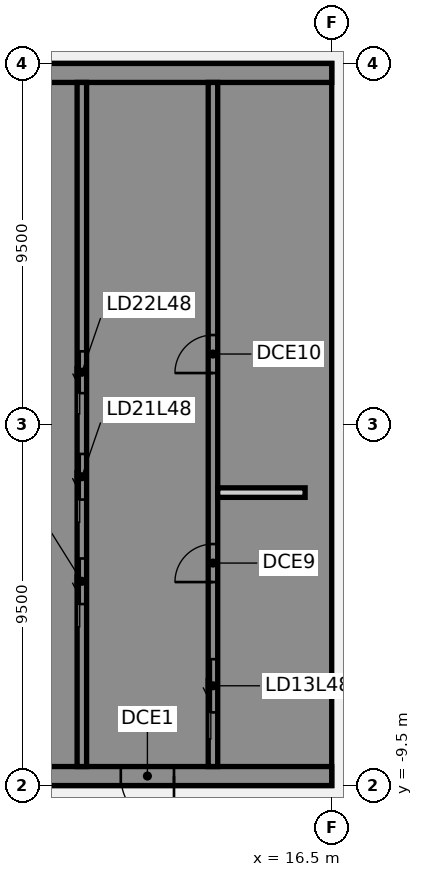
"""IFC4 building model, lengths in metres.
Left out: names, types, materials, properties, quantities, classifications, styles, units other than length and angle.
Written with IfcOpenShell. Run it as: python <this file> out.ifc"""

import sys

from ifc_helpers import new_model, si_unit, direction, frame, frame_2d, origin, place, context, subcontext, project, spatial, polyline, rectangle, outline, extrude, element, fill, save


model = new_model("IFC4")
c1 = context("Model", 3, precision=1e-05, world=origin(), true_north=direction((0.0, 1.0)))
c2 = subcontext(c1, "Body", "Model", "MODEL_VIEW")
j1 = project(units=[si_unit("LENGTHUNIT", "METRE"), si_unit("PLANEANGLEUNIT", "RADIAN")], contexts=[c1])
p1 = place(None, origin())
s1 = spatial("IfcSite", under=j1, at=p1, CompositionType="ELEMENT")
p2 = place(p1, origin())
s2 = spatial("IfcBuilding", under=s1, at=p2, CompositionType="ELEMENT")
p3 = place(p2, frame((0.0, 0.0, 193.3)))
s3 = spatial("IfcBuildingStorey", under=s2, at=p3, CompositionType="ELEMENT", Elevation=193.3)
p4 = place(p3, frame((16.5, -9.25, 0.0), z_axis=(0.0, 0.0, 1.0), x_axis=(-1.0, 0.0, 0.0)))
e1 = element("IfcWall", 1, at=p4, inside=s3, PredefinedType="SHEAR", context=c2, shape_type="SweptSolid", body=[
    extrude(rectangle(XDim=13.0, YDim=0.5, at=frame_2d((6.5, 0.0))), origin(), (0.0, 0.0, 1.0), 3.46),
])
p5 = place(p4, frame((4.15, 0.0, 0.0)))
e2 = element("IfcOpeningElement", 2, at=p5, cuts=e1, PredefinedType="OPENING", context=c2, shape_type="SweptSolid", body=[
    extrude(rectangle(XDim=1.4, YDim=2.1, at=frame_2d((0.7, 1.05))), frame((0.0, 0.26, 0.0), z_axis=(0.0, -1.0, 0.0), x_axis=(1.0, 0.0, 0.0)), (0.0, 0.0, 1.0), 0.52),
])
p6 = place(p4, frame((10.125, 0.0, 0.0)))
e3 = element("IfcOpeningElement", 3, at=p6, cuts=e1, PredefinedType="OPENING", context=c2, shape_type="SweptSolid", body=[
    extrude(rectangle(XDim=1.4, YDim=2.1, at=frame_2d((0.7, 1.05))), frame((0.0, 0.26, 0.0), z_axis=(0.0, -1.0, 0.0), x_axis=(1.0, 0.0, 0.0)), (0.0, 0.0, 1.0), 0.52),
])
p7 = place(p3, origin())
e4 = element("IfcWall", 4, at=p7, inside=s3, PredefinedType="SHEAR", context=c2, shape_type="SweptSolid", body=[
    extrude(outline(polyline([(13.5, -8.125), (13.5, -9.0), (16.0, -9.0), (16.5, -9.0), (16.5, 9.0), (16.0, 9.0), (13.5, 9.0), (13.5, 8.125), (16.0, 8.125), (16.0, 5.625), (13.5, 5.625), (13.5, 5.375), (16.0, 5.375), (16.0, -5.375), (13.5, -5.375), (13.5, -5.625), (16.0, -5.625), (16.0, -8.125), (13.5, -8.125)])), origin(), (0.0, 0.0, 1.0), 3.46),
])
p8 = place(p3, frame((16.5, 9.25, 0.0), z_axis=(0.0, 0.0, 1.0), x_axis=(-1.0, 0.0, 0.0)))
e5 = element("IfcWall", 5, at=p8, inside=s3, PredefinedType="SHEAR", context=c2, shape_type="SweptSolid", body=[
    extrude(rectangle(XDim=13.0, YDim=0.5, at=frame_2d((6.5, 0.0))), origin(), (0.0, 0.0, 1.0), 3.46),
])
p9 = place(p3, origin())
e6 = element("IfcWall", 6, at=p9, inside=s3, PredefinedType="SHEAR", context=c2, shape_type="SweptSolid", body=[
    extrude(outline(polyline([(9.8, -5.375), (7.5, -5.375), (7.5, -2.875), (9.8, -2.875), (9.8, -2.625), (7.5, -2.625), (7.5, -0.125), (9.8, -0.125), (9.8, 0.125), (7.5, 0.125), (7.5, 2.625), (9.8, 2.625), (9.8, 2.875), (7.5, 2.875), (7.5, 5.375), (9.8, 5.375), (9.8, 5.625), (7.5, 5.625), (7.5, 8.125), (9.8, 8.125), (9.8, 9.0), (7.5, 9.0), (7.25, 9.0), (7.25, -5.625), (7.5, -5.625), (9.8, -5.625), (9.8, -5.375)])), origin(), (0.0, 0.0, 1.0), 3.46),
])
p10 = place(p3, origin())
e7 = element("IfcWall", 7, at=p10, inside=s3, PredefinedType="SHEAR", context=c2, shape_type="SweptSolid", body=[
    extrude(outline(polyline([(7.5, -8.125), (7.5, -9.0), (9.8, -9.0), (9.8, -8.125), (9.8, -5.625), (9.55, -5.625), (9.55, -8.125), (7.5, -8.125)])), origin(), (0.0, 0.0, 1.0), 3.46),
])
p11 = place(p3, frame((13.375, -9.0, 0.0), z_axis=(0.0, 0.0, 1.0), x_axis=(0.0, 1.0, 0.0)))
e8 = element("IfcWall", 8, at=p11, inside=s3, PredefinedType="SHEAR", context=c2, shape_type="SweptSolid", body=[
    extrude(rectangle(XDim=18.0, YDim=0.25, at=frame_2d((9.0, 0.0))), origin(), (0.0, 0.0, 1.0), 3.46),
])
p12 = place(p11, frame((1.425, 0.0, 0.0)))
e9 = element("IfcOpeningElement", 9, at=p12, cuts=e8, PredefinedType="OPENING", context=c2, shape_type="SweptSolid", body=[
    extrude(rectangle(XDim=1.4, YDim=2.1, at=frame_2d((0.7, 1.05))), frame((0.0, 0.135, 0.0), z_axis=(0.0, -1.0, 0.0), x_axis=(1.0, 0.0, 0.0)), (0.0, 0.0, 1.0), 0.27),
])
p13 = place(p11, frame((4.854, 0.0, 0.0)))
e10 = element("IfcOpeningElement", 10, at=p13, cuts=e8, PredefinedType="OPENING", context=c2, shape_type="SweptSolid", body=[
    extrude(rectangle(XDim=1.0, YDim=2.1, at=frame_2d((0.5, 1.05))), frame((0.0, 0.135, 0.0), z_axis=(0.0, -1.0, 0.0), x_axis=(1.0, 0.0, 0.0)), (0.0, 0.0, 1.0), 0.27),
])
p14 = place(p11, frame((10.354, 0.0, 0.0)))
e11 = element("IfcOpeningElement", 11, at=p14, cuts=e8, PredefinedType="OPENING", context=c2, shape_type="SweptSolid", body=[
    extrude(rectangle(XDim=1.0, YDim=2.1, at=frame_2d((0.5, 1.05))), frame((0.0, 0.135, 0.0), z_axis=(0.0, -1.0, 0.0), x_axis=(1.0, 0.0, 0.0)), (0.0, 0.0, 1.0), 0.27),
])
p15 = place(p3, frame((9.925, -9.0, 0.0), z_axis=(0.0, 0.0, 1.0), x_axis=(0.0, 1.0, 0.0)))
e12 = element("IfcWall", 12, at=p15, inside=s3, PredefinedType="SHEAR", context=c2, shape_type="SweptSolid", body=[
    extrude(rectangle(XDim=18.0, YDim=0.25, at=frame_2d((9.0, 0.0))), origin(), (0.0, 0.0, 1.0), 3.46),
])
p16 = place(p15, frame((4.275, 0.0, 0.0)))
e13 = element("IfcOpeningElement", 13, at=p16, cuts=e12, PredefinedType="OPENING", context=c2, shape_type="SweptSolid", body=[
    extrude(rectangle(XDim=1.2, YDim=2.1, at=frame_2d((0.6, 1.05))), frame((0.0, 0.135, 0.0), z_axis=(0.0, -1.0, 0.0), x_axis=(1.0, 0.0, 0.0)), (0.0, 0.0, 1.0), 0.27),
])
p17 = place(p15, frame((7.025, 0.0, 0.0)))
e14 = element("IfcOpeningElement", 14, at=p17, cuts=e12, PredefinedType="OPENING", context=c2, shape_type="SweptSolid", body=[
    extrude(rectangle(XDim=1.2, YDim=2.1, at=frame_2d((0.6, 1.05))), frame((0.0, 0.135, 0.0), z_axis=(0.0, -1.0, 0.0), x_axis=(1.0, 0.0, 0.0)), (0.0, 0.0, 1.0), 0.27),
])
p18 = place(p15, frame((9.825, 0.0, 0.0)))
e15 = element("IfcOpeningElement", 15, at=p18, cuts=e12, PredefinedType="OPENING", context=c2, shape_type="SweptSolid", body=[
    extrude(rectangle(XDim=1.1, YDim=2.1, at=frame_2d((0.55, 1.05))), frame((0.0, 0.135, 0.0), z_axis=(0.0, -1.0, 0.0), x_axis=(1.0, 0.0, 0.0)), (0.0, 0.0, 1.0), 0.27),
])
p19 = place(p3, frame((15.8, -1.792, 0.0), z_axis=(0.0, 0.0, 1.0), x_axis=(-1.0, 0.0, 0.0)))
e16 = element("IfcWall", 16, at=p19, inside=s3, PredefinedType="PARTITIONING", context=c2, shape_type="SweptSolid", body=[
    extrude(rectangle(XDim=2.3, YDim=0.25, at=frame_2d((1.15, 0.0))), origin(), (0.0, 0.0, 1.0), 3.46),
])
p20 = place(p5, origin())
e17 = element("IfcDoor", 17, at=p20, inside=s3, OperationType="SINGLE_SWING_LEFT", PredefinedType="DOOR", context=c2, shape_type="SweptSolid", body=[
    extrude(rectangle(XDim=1.4, YDim=2.1, at=frame_2d((0.7, 1.05))), frame((0.0, 0.025, 0.0), z_axis=(0.0, -1.0, 0.0), x_axis=(1.0, 0.0, 0.0)), (0.0, 0.0, 1.0), 0.05),
])
fill(e2, e17)
p21 = place(p12, origin())
e18 = element("IfcDoor", 18, at=p21, inside=s3, OperationType="SLIDING_TO_LEFT", PredefinedType="DOOR", context=c2, shape_type="SweptSolid", body=[
    extrude(rectangle(XDim=1.4, YDim=2.1, at=frame_2d((0.7, 1.05))), frame((0.0, 0.025, 0.0), z_axis=(0.0, -1.0, 0.0), x_axis=(1.0, 0.0, 0.0)), (0.0, 0.0, 1.0), 0.05),
])
fill(e9, e18)
p22 = place(p16, origin())
e19 = element("IfcDoor", 19, at=p22, inside=s3, OperationType="SLIDING_TO_LEFT", PredefinedType="DOOR", context=c2, shape_type="SweptSolid", body=[
    extrude(rectangle(XDim=1.2, YDim=2.1, at=frame_2d((0.6, 1.05))), frame((0.0, 0.025, 0.0), z_axis=(0.0, -1.0, 0.0), x_axis=(1.0, 0.0, 0.0)), (0.0, 0.0, 1.0), 0.05),
])
fill(e13, e19)
p23 = place(p17, origin())
e20 = element("IfcDoor", 20, at=p23, inside=s3, OperationType="SLIDING_TO_LEFT", PredefinedType="DOOR", context=c2, shape_type="SweptSolid", body=[
    extrude(rectangle(XDim=1.2, YDim=2.1, at=frame_2d((0.6, 1.05))), frame((0.0, 0.025, 0.0), z_axis=(0.0, -1.0, 0.0), x_axis=(1.0, 0.0, 0.0)), (0.0, 0.0, 1.0), 0.05),
])
fill(e14, e20)
p24 = place(p18, origin())
e21 = element("IfcDoor", 21, at=p24, inside=s3, OperationType="SLIDING_TO_LEFT", PredefinedType="DOOR", context=c2, shape_type="SweptSolid", body=[
    extrude(rectangle(XDim=1.1, YDim=2.1, at=frame_2d((0.55, 1.05))), frame((0.0, 0.025, 0.0), z_axis=(0.0, -1.0, 0.0), x_axis=(1.0, 0.0, 0.0)), (0.0, 0.0, 1.0), 0.05),
])
fill(e15, e21)
p25 = place(p13, origin())
e22 = element("IfcDoor", 22, at=p25, inside=s3, OperationType="SINGLE_SWING_LEFT", PredefinedType="DOOR", context=c2, shape_type="SweptSolid", body=[
    extrude(rectangle(XDim=1.0, YDim=2.1, at=frame_2d((0.5, 1.05))), frame((0.0, 0.025, 0.0), z_axis=(0.0, -1.0, 0.0), x_axis=(1.0, 0.0, 0.0)), (0.0, 0.0, 1.0), 0.05),
])
fill(e10, e22)
p26 = place(p14, origin())
e23 = element("IfcDoor", 23, at=p26, inside=s3, OperationType="SINGLE_SWING_LEFT", PredefinedType="DOOR", context=c2, shape_type="SweptSolid", body=[
    extrude(rectangle(XDim=1.0, YDim=2.1, at=frame_2d((0.5, 1.05))), frame((0.0, 0.025, 0.0), z_axis=(0.0, -1.0, 0.0), x_axis=(1.0, 0.0, 0.0)), (0.0, 0.0, 1.0), 0.05),
])
fill(e11, e23)
save(model, sys.argv[1])
